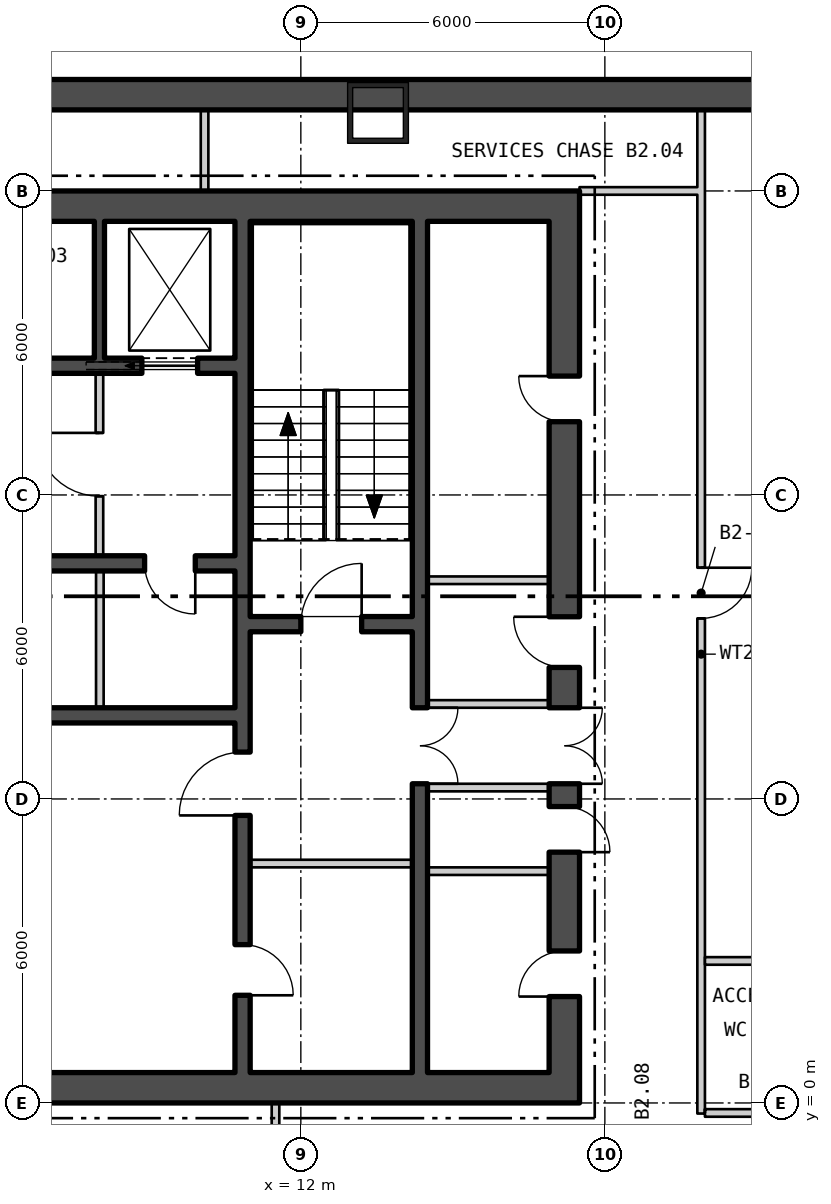
"""IFC4 building model, lengths in metres.
Left out: names, types, materials, properties, quantities, classifications, styles, units other than length and angle.
Written with IfcOpenShell. Run it as: python <this file> out.ifc"""

import sys

from ifc_helpers import new_model, si_unit, direction, frame, frame_2d, origin, origin_2d, place, context, subcontext, project, spatial, rectangle, hollow_rectangle, extrude, element, fill, save


model = new_model("IFC4")
c1 = context("Model", 3, precision=1e-05, world=origin(), true_north=direction((0.0, 1.0)))
c2 = subcontext(c1, "Body", "Model", "MODEL_VIEW")
j1 = project(units=[si_unit("LENGTHUNIT", "METRE"), si_unit("PLANEANGLEUNIT", "RADIAN")], contexts=[c1])
p1 = place(None, origin())
s1 = spatial("IfcSite", under=j1, at=p1, CompositionType="ELEMENT")
p2 = place(p1, origin())
s2 = spatial("IfcBuilding", under=s1, at=p2, CompositionType="ELEMENT")
p3 = place(p2, frame((0.0, 0.0, -11.4)))
s3 = spatial("IfcBuildingStorey", under=s2, at=p3, CompositionType="ELEMENT", Elevation=-11.4)
p4 = place(p3, frame((13.523, 19.54, 0.0), z_axis=(0.0, 0.0, 1.0), x_axis=(-1.0, 0.0, 0.0)))
e1 = element("IfcColumn", 1, at=p4, inside=s3, PredefinedType="COLUMN", context=c2, shape_type="SweptSolid", body=[
    extrude(hollow_rectangle(XDim=1.2, YDim=1.2, WallThickness=0.1, at=origin_2d()), origin(), (0.0, 0.0, 1.0), 5.7),
])
p5 = place(p3, frame((-39.0, 19.9, -0.4), z_axis=(0.0, 0.0, 1.0), x_axis=(1.0, 0.0, 0.0)))
e2 = element("IfcWall", 2, at=p5, inside=s3, PredefinedType="STANDARD", context=c2, shape_type="SweptSolid", body=[
    extrude(rectangle(XDim=78.0, YDim=0.6, at=frame_2d((39.0, 0.0))), origin(), (0.0, 0.0, 1.0), 5.7),
])
p6 = place(p3, frame((-17.5, 0.3, 0.0), z_axis=(0.0, 0.0, 1.0), x_axis=(1.0, 0.0, 0.0)))
e3 = element("IfcWall", 3, at=p6, inside=s3, PredefinedType="SHEAR", context=c2, shape_type="SweptSolid", body=[
    extrude(rectangle(XDim=35.0, YDim=0.6, at=frame_2d((17.5, 0.0))), origin(), (0.0, 0.0, 1.0), 5.25),
])
p7 = place(p6, frame((12.0, 0.0, 0.0)))
e4 = element("IfcOpeningElement", 4, at=p7, cuts=e3, PredefinedType="OPENING", context=c2, shape_type="SweptSolid", body=[
    extrude(rectangle(XDim=1.8, YDim=2.4, at=frame_2d((0.9, 1.2))), frame((0.0, 0.31, 0.0), z_axis=(0.0, -1.0, 0.0), x_axis=(1.0, 0.0, 0.0)), (0.0, 0.0, 1.0), 0.62),
])
p8 = place(p6, frame((22.0, 0.0, 0.0)))
e5 = element("IfcOpeningElement", 5, at=p8, cuts=e3, PredefinedType="OPENING", context=c2, shape_type="SweptSolid", body=[
    extrude(rectangle(XDim=1.8, YDim=2.4, at=frame_2d((0.9, 1.2))), frame((0.0, 0.31, 0.0), z_axis=(0.0, -1.0, 0.0), x_axis=(1.0, 0.0, 0.0)), (0.0, 0.0, 1.0), 0.62),
])
p9 = place(p3, frame((-17.5, 17.7, 0.0), z_axis=(0.0, 0.0, 1.0), x_axis=(1.0, 0.0, 0.0)))
e6 = element("IfcWall", 6, at=p9, inside=s3, PredefinedType="SHEAR", context=c2, shape_type="SweptSolid", body=[
    extrude(rectangle(XDim=35.0, YDim=0.6, at=frame_2d((17.5, 0.0))), origin(), (0.0, 0.0, 1.0), 5.25),
])
p10 = place(p3, frame((17.2, 0.6, 0.0), z_axis=(0.0, 0.0, 1.0), x_axis=(0.0, 1.0, 0.0)))
e7 = element("IfcWall", 7, at=p10, inside=s3, PredefinedType="SHEAR", context=c2, shape_type="SweptSolid", body=[
    extrude(rectangle(XDim=16.8, YDim=0.6, at=frame_2d((8.4, 0.0))), origin(), (0.0, 0.0, 1.0), 5.25),
])
p11 = place(p10, frame((5.7, 0.0, 0.0)))
e8 = element("IfcOpeningElement", 8, at=p11, cuts=e7, PredefinedType="OPENING", context=c2, shape_type="SweptSolid", body=[
    extrude(rectangle(XDim=1.5, YDim=2.1, at=frame_2d((0.75, 1.05))), frame((0.0, 0.31, 0.0), z_axis=(0.0, -1.0, 0.0), x_axis=(1.0, 0.0, 0.0)), (0.0, 0.0, 1.0), 0.62),
])
p12 = place(p10, frame((1.5, 0.0, 0.0)))
e9 = element("IfcOpeningElement", 9, at=p12, cuts=e7, PredefinedType="OPENING", context=c2, shape_type="SweptSolid", body=[
    extrude(rectangle(XDim=0.9, YDim=2.1, at=frame_2d((0.45, 1.05))), frame((0.0, 0.31, 0.0), z_axis=(0.0, -1.0, 0.0), x_axis=(1.0, 0.0, 0.0)), (0.0, 0.0, 1.0), 0.62),
])
p13 = place(p10, frame((4.35, 0.0, 0.0)))
e10 = element("IfcOpeningElement", 10, at=p13, cuts=e7, PredefinedType="OPENING", context=c2, shape_type="SweptSolid", body=[
    extrude(rectangle(XDim=0.9, YDim=2.1, at=frame_2d((0.45, 1.05))), frame((0.0, 0.31, 0.0), z_axis=(0.0, -1.0, 0.0), x_axis=(1.0, 0.0, 0.0)), (0.0, 0.0, 1.0), 0.62),
])
p14 = place(p10, frame((7.996, 0.0, 0.0)))
e11 = element("IfcOpeningElement", 11, at=p14, cuts=e7, PredefinedType="OPENING", context=c2, shape_type="SweptSolid", body=[
    extrude(rectangle(XDim=1.0, YDim=2.1, at=frame_2d((0.5, 1.05))), frame((0.0, 0.31, 0.0), z_axis=(0.0, -1.0, 0.0), x_axis=(1.0, 0.0, 0.0)), (0.0, 0.0, 1.0), 0.62),
])
p15 = place(p10, frame((12.846, 0.0, 0.0)))
e12 = element("IfcOpeningElement", 12, at=p15, cuts=e7, PredefinedType="OPENING", context=c2, shape_type="SweptSolid", body=[
    extrude(rectangle(XDim=0.9, YDim=2.1, at=frame_2d((0.45, 1.05))), frame((0.0, 0.31, 0.0), z_axis=(0.0, -1.0, 0.0), x_axis=(1.0, 0.0, 0.0)), (0.0, 0.0, 1.0), 0.62),
])
p16 = place(p3, frame((10.85, 0.6, 0.0), z_axis=(0.0, 0.0, 1.0), x_axis=(0.0, 1.0, 0.0)))
e13 = element("IfcWall", 13, at=p16, inside=s3, PredefinedType="SHEAR", context=c2, shape_type="SweptSolid", body=[
    extrude(rectangle(XDim=16.8, YDim=0.3, at=frame_2d((8.4, 0.0))), origin(), (0.0, 0.0, 1.0), 5.25),
])
p17 = place(p16, frame((5.075, 0.0, 0.0)))
e14 = element("IfcOpeningElement", 14, at=p17, cuts=e13, PredefinedType="OPENING", context=c2, shape_type="SweptSolid", body=[
    extrude(rectangle(XDim=1.25, YDim=2.1, at=frame_2d((0.625, 1.05))), frame((0.0, 0.16, 0.0), z_axis=(0.0, -1.0, 0.0), x_axis=(1.0, 0.0, 0.0)), (0.0, 0.0, 1.0), 0.32),
])
p18 = place(p16, frame((1.525, 0.0, 0.0)))
e15 = element("IfcOpeningElement", 15, at=p18, cuts=e13, PredefinedType="OPENING", context=c2, shape_type="SweptSolid", body=[
    extrude(rectangle(XDim=1.0, YDim=2.1, at=frame_2d((0.5, 1.05))), frame((0.0, 0.16, 0.0), z_axis=(0.0, -1.0, 0.0), x_axis=(1.0, 0.0, 0.0)), (0.0, 0.0, 1.0), 0.32),
])
p19 = place(p3, frame((14.35, 0.6, 0.0), z_axis=(0.0, 0.0, 1.0), x_axis=(0.0, 1.0, 0.0)))
e16 = element("IfcWall", 16, at=p19, inside=s3, PredefinedType="SHEAR", context=c2, shape_type="SweptSolid", body=[
    extrude(rectangle(XDim=16.8, YDim=0.3, at=frame_2d((8.4, 0.0))), origin(), (0.0, 0.0, 1.0), 5.25),
])
p20 = place(p19, frame((5.7, 0.0, 0.0)))
e17 = element("IfcOpeningElement", 17, at=p20, cuts=e16, PredefinedType="OPENING", context=c2, shape_type="SweptSolid", body=[
    extrude(rectangle(XDim=1.5, YDim=2.1, at=frame_2d((0.75, 1.05))), frame((0.0, 0.16, 0.0), z_axis=(0.0, -1.0, 0.0), x_axis=(1.0, 0.0, 0.0)), (0.0, 0.0, 1.0), 0.32),
])
p21 = place(p3, frame((11.0, 9.45, 0.0), z_axis=(0.0, 0.0, 1.0), x_axis=(1.0, 0.0, 0.0)))
e18 = element("IfcWall", 18, at=p21, inside=s3, PredefinedType="SHEAR", context=c2, shape_type="SweptSolid", body=[
    extrude(rectangle(XDim=3.2, YDim=0.3, at=frame_2d((1.6, 0.0))), origin(), (0.0, 0.0, 1.0), 5.25),
])
p22 = place(p21, frame((1.0, 0.0, 0.0)))
e19 = element("IfcOpeningElement", 19, at=p22, cuts=e18, PredefinedType="OPENING", context=c2, shape_type="SweptSolid", body=[
    extrude(rectangle(XDim=1.2, YDim=2.1, at=frame_2d((0.6, 1.05))), frame((0.0, 0.16, 0.0), z_axis=(0.0, -1.0, 0.0), x_axis=(1.0, 0.0, 0.0)), (0.0, 0.0, 1.0), 0.32),
])
p23 = place(p3, frame((-10.7, 14.55, 0.0), z_axis=(0.0, 0.0, 1.0), x_axis=(1.0, 0.0, 0.0)))
e20 = element("IfcWall", 20, at=p23, inside=s3, PredefinedType="SHEAR", context=c2, shape_type="SweptSolid", body=[
    extrude(rectangle(XDim=21.4, YDim=0.3, at=frame_2d((10.7, 0.0))), origin(), (0.0, 0.0, 1.0), 5.25),
])
p24 = place(p23, frame((0.738, 0.0, 0.0)))
e21 = element("IfcOpeningElement", 21, at=p24, cuts=e20, PredefinedType="OPENING", context=c2, shape_type="SweptSolid", body=[
    extrude(rectangle(XDim=1.1, YDim=2.1, at=frame_2d((0.55, 1.05))), frame((0.0, 0.16, 0.0), z_axis=(0.0, -1.0, 0.0), x_axis=(1.0, 0.0, 0.0)), (0.0, 0.0, 1.0), 0.32),
])
p25 = place(p23, frame((19.562, 0.0, 0.0)))
e22 = element("IfcOpeningElement", 22, at=p25, cuts=e20, PredefinedType="OPENING", context=c2, shape_type="SweptSolid", body=[
    extrude(rectangle(XDim=1.1, YDim=2.1, at=frame_2d((0.55, 1.05))), frame((0.0, 0.16, 0.0), z_axis=(0.0, -1.0, 0.0), x_axis=(1.0, 0.0, 0.0)), (0.0, 0.0, 1.0), 0.32),
])
p26 = place(p23, frame((3.513, 0.0, 0.0)))
e23 = element("IfcOpeningElement", 23, at=p26, cuts=e20, PredefinedType="OPENING", context=c2, shape_type="SweptSolid", body=[
    extrude(rectangle(XDim=1.0, YDim=2.1, at=frame_2d((0.5, 1.05))), frame((0.0, 0.16, 0.0), z_axis=(0.0, -1.0, 0.0), x_axis=(1.0, 0.0, 0.0)), (0.0, 0.0, 1.0), 0.32),
])
p27 = place(p23, frame((6.188, 0.0, 0.0)))
e24 = element("IfcOpeningElement", 24, at=p27, cuts=e20, PredefinedType="OPENING", context=c2, shape_type="SweptSolid", body=[
    extrude(rectangle(XDim=1.0, YDim=2.1, at=frame_2d((0.5, 1.05))), frame((0.0, 0.16, 0.0), z_axis=(0.0, -1.0, 0.0), x_axis=(1.0, 0.0, 0.0)), (0.0, 0.0, 1.0), 0.32),
])
p28 = place(p23, frame((8.863, 0.0, 0.0)))
e25 = element("IfcOpeningElement", 25, at=p28, cuts=e20, PredefinedType="OPENING", context=c2, shape_type="SweptSolid", body=[
    extrude(rectangle(XDim=1.0, YDim=2.1, at=frame_2d((0.5, 1.05))), frame((0.0, 0.16, 0.0), z_axis=(0.0, -1.0, 0.0), x_axis=(1.0, 0.0, 0.0)), (0.0, 0.0, 1.0), 0.32),
])
p29 = place(p23, frame((14.213, 0.0, 0.0)))
e26 = element("IfcOpeningElement", 26, at=p29, cuts=e20, PredefinedType="OPENING", context=c2, shape_type="SweptSolid", body=[
    extrude(rectangle(XDim=1.0, YDim=2.1, at=frame_2d((0.5, 1.05))), frame((0.0, 0.16, 0.0), z_axis=(0.0, -1.0, 0.0), x_axis=(1.0, 0.0, 0.0)), (0.0, 0.0, 1.0), 0.32),
])
p30 = place(p3, frame((2.6, 10.65, 0.0), z_axis=(0.0, 0.0, 1.0), x_axis=(1.0, 0.0, 0.0)))
e27 = element("IfcWall", 27, at=p30, inside=s3, PredefinedType="SHEAR", context=c2, shape_type="SweptSolid", body=[
    extrude(rectangle(XDim=8.1, YDim=0.3, at=frame_2d((4.05, 0.0))), origin(), (0.0, 0.0, 1.0), 5.25),
])
p31 = place(p30, frame((2.267, 0.0, 0.0)))
e28 = element("IfcOpeningElement", 28, at=p31, cuts=e27, PredefinedType="OPENING", context=c2, shape_type="SweptSolid", body=[
    extrude(rectangle(XDim=1.0, YDim=2.1, at=frame_2d((0.5, 1.05))), frame((0.0, 0.16, 0.0), z_axis=(0.0, -1.0, 0.0), x_axis=(1.0, 0.0, 0.0)), (0.0, 0.0, 1.0), 0.32),
])
p32 = place(p30, frame((6.317, 0.0, 0.0)))
e29 = element("IfcOpeningElement", 29, at=p32, cuts=e27, PredefinedType="OPENING", context=c2, shape_type="SweptSolid", body=[
    extrude(rectangle(XDim=1.0, YDim=2.1, at=frame_2d((0.5, 1.05))), frame((0.0, 0.16, 0.0), z_axis=(0.0, -1.0, 0.0), x_axis=(1.0, 0.0, 0.0)), (0.0, 0.0, 1.0), 0.32),
])
p33 = place(p3, frame((2.6, 7.65, 0.0), z_axis=(0.0, 0.0, 1.0), x_axis=(1.0, 0.0, 0.0)))
e30 = element("IfcWall", 30, at=p33, inside=s3, PredefinedType="SHEAR", context=c2, shape_type="SweptSolid", body=[
    extrude(rectangle(XDim=8.1, YDim=0.3, at=frame_2d((4.05, 0.0))), origin(), (0.0, 0.0, 1.0), 5.25),
])
p34 = place(p3, frame((8.025, 14.7, 0.0), z_axis=(0.0, 0.0, 1.0), x_axis=(0.0, 1.0, 0.0)))
e31 = element("IfcWall", 31, at=p34, inside=s3, PredefinedType="SHEAR", context=c2, shape_type="SweptSolid", body=[
    extrude(rectangle(XDim=2.7, YDim=0.2, at=frame_2d((1.35, 0.0))), origin(), (0.0, 0.0, 1.0), 5.25),
])
p35 = place(p3, frame((8.033, 7.8, 0.0), z_axis=(0.0, 0.0, 1.0), x_axis=(0.0, 1.0, 0.0)))
e32 = element("IfcWall", 32, at=p35, inside=s3, PredefinedType="PARTITIONING", context=c2, shape_type="SweptSolid", body=[
    extrude(rectangle(XDim=2.7, YDim=0.15, at=frame_2d((1.35, 0.0))), origin(), (0.0, 0.0, 1.0), 5.25),
])
p36 = place(p3, frame((8.025, 10.8, 0.0), z_axis=(0.0, 0.0, 1.0), x_axis=(0.0, 1.0, 0.0)))
e33 = element("IfcWall", 33, at=p36, inside=s3, PredefinedType="PARTITIONING", context=c2, shape_type="SweptSolid", body=[
    extrude(rectangle(XDim=3.6, YDim=0.15, at=frame_2d((1.8, 0.0))), origin(), (0.0, 0.0, 1.0), 5.25),
])
p37 = place(p36, frame((1.175, 0.0, 0.0)))
e34 = element("IfcOpeningElement", 34, at=p37, cuts=e33, PredefinedType="OPENING", context=c2, shape_type="SweptSolid", body=[
    extrude(rectangle(XDim=1.25, YDim=2.1, at=frame_2d((0.625, 1.05))), frame((0.0, 0.085, 0.0), z_axis=(0.0, -1.0, 0.0), x_axis=(1.0, 0.0, 0.0)), (0.0, 0.0, 1.0), 0.17),
])
p38 = place(p3, frame((11.0, 4.725, 0.0), z_axis=(0.0, 0.0, 1.0), x_axis=(1.0, 0.0, 0.0)))
e35 = element("IfcWall", 35, at=p38, inside=s3, PredefinedType="PARTITIONING", context=c2, shape_type="SweptSolid", body=[
    extrude(rectangle(XDim=3.2, YDim=0.15, at=frame_2d((1.6, 0.0))), origin(), (0.0, 0.0, 1.0), 5.25),
])
for number, where, z_axis, x_axis in (
    (36, (14.5, 6.225, 0.0), (0.0, 0.0, 1.0), (1.0, 0.0, 0.0)),
    (37, (14.5, 7.875, 0.0), (0.0, 0.0, 1.0), (1.0, 0.0, 0.0)),
    (38, (14.5, 4.575, 0.0), (0.0, 0.0, 1.0), (1.0, 0.0, 0.0)),
    (39, (14.5, 10.317, 0.0), (0.0, 0.0, 1.0), (1.0, 0.0, 0.0)),
):
    element("IfcWall", number, at=place(p3, frame(where, z_axis=z_axis, x_axis=x_axis)), inside=s3, PredefinedType="PARTITIONING", context=c2, shape_type="SweptSolid", body=[
        extrude(rectangle(XDim=2.4, YDim=0.15, at=frame_2d((1.2, 0.0))), origin(), (0.0, 0.0, 1.0), 5.25),
    ])
p39 = place(p3, frame((10.1, 18.0, 0.0), z_axis=(0.0, 0.0, 1.0), x_axis=(0.0, 1.0, 0.0)))
e40 = element("IfcWall", 40, at=p39, inside=s3, PredefinedType="PARTITIONING", context=c2, shape_type="SweptSolid", body=[
    extrude(rectangle(XDim=1.75, YDim=0.15, at=frame_2d((0.875, 0.0))), origin(), (0.0, 0.0, 1.0), 5.25),
])
p40 = place(p3, frame((11.5, -6.075, 0.0), z_axis=(0.0, 0.0, 1.0), x_axis=(0.0, 1.0, 0.0)))
e41 = element("IfcWall", 41, at=p40, inside=s3, PredefinedType="PARTITIONING", context=c2, shape_type="SweptSolid", body=[
    extrude(rectangle(XDim=6.075, YDim=0.15, at=frame_2d((3.038, 0.0))), origin(), (0.0, 0.0, 1.0), 5.25),
])
p41 = place(p40, frame((4.375, 0.0, 0.0)))
e42 = element("IfcOpeningElement", 42, at=p41, cuts=e41, PredefinedType="OPENING", context=c2, shape_type="SweptSolid", body=[
    extrude(rectangle(XDim=1.0, YDim=2.1, at=frame_2d((0.5, 1.05))), frame((0.0, 0.085, 0.0), z_axis=(0.0, -1.0, 0.0), x_axis=(1.0, 0.0, 0.0)), (0.0, 0.0, 1.0), 0.17),
])
p42 = place(p3, frame((17.5, 18.0, 0.0), z_axis=(0.0, 0.0, 1.0), x_axis=(1.0, 0.0, 0.0)))
e43 = element("IfcWall", 43, at=p42, inside=s3, PredefinedType="PARTITIONING", context=c2, shape_type="SweptSolid", body=[
    extrude(rectangle(XDim=2.475, YDim=0.15, at=frame_2d((1.238, 0.0))), origin(), (0.0, 0.0, 1.0), 5.25),
])
p43 = place(p3, frame((19.9, -0.209, 0.0), z_axis=(0.0, 0.0, 1.0), x_axis=(0.0, 1.0, 0.0)))
e44 = element("IfcWall", 44, at=p43, inside=s3, PredefinedType="PARTITIONING", context=c2, shape_type="SweptSolid", body=[
    extrude(rectangle(XDim=18.134, YDim=0.15, at=frame_2d((9.067, 0.0))), origin(), (0.0, 0.0, 1.0), 5.25),
])
p44 = place(p43, frame((9.773, 0.0, 0.0)))
e45 = element("IfcOpeningElement", 45, at=p44, cuts=e44, PredefinedType="OPENING", context=c2, shape_type="SweptSolid", body=[
    extrude(rectangle(XDim=1.0, YDim=2.1, at=frame_2d((0.5, 1.05))), frame((0.0, 0.085, 0.0), z_axis=(0.0, -1.0, 0.0), x_axis=(1.0, 0.0, 0.0)), (0.0, 0.0, 1.0), 0.17),
])
p45 = place(p3, frame((19.9, 18.075, 0.0), z_axis=(0.0, 0.0, 1.0), x_axis=(0.0, 1.0, 0.0)))
e46 = element("IfcWall", 46, at=p45, inside=s3, PredefinedType="PARTITIONING", context=c2, shape_type="SweptSolid", body=[
    extrude(rectangle(XDim=1.675, YDim=0.15, at=frame_2d((0.838, 0.0))), origin(), (0.0, 0.0, 1.0), 5.25),
])
p46 = place(p3, frame((19.975, 2.803, 0.0), z_axis=(0.0, 0.0, 1.0), x_axis=(1.0, 0.0, 0.0)))
e47 = element("IfcWall", 47, at=p46, inside=s3, PredefinedType="PARTITIONING", context=c2, shape_type="SweptSolid", body=[
    extrude(rectangle(XDim=2.925, YDim=0.15, at=frame_2d((1.462, 0.0))), origin(), (0.0, 0.0, 1.0), 5.25),
])
p47 = place(p3, frame((19.975, -0.197, 0.0), z_axis=(0.0, 0.0, 1.0), x_axis=(0.999999901962, -0.000442804385, 0.0)))
e48 = element("IfcWall", 48, at=p47, inside=s3, PredefinedType="PARTITIONING", context=c2, shape_type="SweptSolid", body=[
    extrude(rectangle(XDim=6.775, YDim=0.15, at=frame_2d((3.388, 0.0))), origin(), (0.0, 0.0, 1.0), 5.25),
])
p48 = place(p47, frame((0.962, 0.0, 0.0)))
e49 = element("IfcOpeningElement", 49, at=p48, cuts=e48, PredefinedType="OPENING", context=c2, shape_type="SweptSolid", body=[
    extrude(rectangle(XDim=1.0, YDim=2.1, at=frame_2d((0.5, 1.05))), frame((0.0, 0.085, 0.0), z_axis=(0.0, -1.0, 0.0), x_axis=(1.0, 0.0, 0.0)), (0.0, 0.0, 1.0), 0.17),
])
p49 = place(p25, origin())
e50 = element("IfcDoor", 50, at=p49, inside=s3, OperationType="SLIDING_TO_LEFT", PredefinedType="DOOR", context=c2, shape_type="SweptSolid", body=[
    extrude(rectangle(XDim=1.1, YDim=2.1, at=frame_2d((0.55, 1.05))), frame((0.0, 0.025, 0.0), z_axis=(0.0, -1.0, 0.0), x_axis=(1.0, 0.0, 0.0)), (0.0, 0.0, 1.0), 0.05),
])
fill(e22, e50)
p50 = place(p32, origin())
e51 = element("IfcDoor", 51, at=p50, inside=s3, OperationType="SINGLE_SWING_RIGHT", PredefinedType="DOOR", context=c2, shape_type="SweptSolid", body=[
    extrude(rectangle(XDim=1.0, YDim=2.1, at=frame_2d((0.5, 1.05))), frame((0.0, 0.025, 0.0), z_axis=(0.0, -1.0, 0.0), x_axis=(1.0, 0.0, 0.0)), (0.0, 0.0, 1.0), 0.05),
])
fill(e29, e51)
p51 = place(p37, origin())
e52 = element("IfcDoor", 52, at=p51, inside=s3, OperationType="SINGLE_SWING_LEFT", PredefinedType="DOOR", context=c2, shape_type="SweptSolid", body=[
    extrude(rectangle(XDim=1.25, YDim=2.1, at=frame_2d((0.625, 1.05))), frame((0.0, 0.025, 0.0), z_axis=(0.0, -1.0, 0.0), x_axis=(1.0, 0.0, 0.0)), (0.0, 0.0, 1.0), 0.05),
])
fill(e34, e52)
p52 = place(p22, origin())
e53 = element("IfcDoor", 53, at=p52, inside=s3, OperationType="SINGLE_SWING_LEFT", PredefinedType="DOOR", context=c2, shape_type="SweptSolid", body=[
    extrude(rectangle(XDim=1.2, YDim=2.1, at=frame_2d((0.6, 1.05))), frame((0.0, 0.025, 0.0), z_axis=(0.0, -1.0, 0.0), x_axis=(1.0, 0.0, 0.0)), (0.0, 0.0, 1.0), 0.05),
])
fill(e19, e53)
p53 = place(p17, origin())
e54 = element("IfcDoor", 54, at=p53, inside=s3, OperationType="SINGLE_SWING_RIGHT", PredefinedType="DOOR", context=c2, shape_type="SweptSolid", body=[
    extrude(rectangle(XDim=1.25, YDim=2.1, at=frame_2d((0.625, 1.05))), frame((0.0, 0.025, 0.0), z_axis=(0.0, -1.0, 0.0), x_axis=(1.0, 0.0, 0.0)), (0.0, 0.0, 1.0), 0.05),
])
fill(e14, e54)
p54 = place(p18, origin())
e55 = element("IfcDoor", 55, at=p54, inside=s3, OperationType="SINGLE_SWING_LEFT", PredefinedType="DOOR", context=c2, shape_type="SweptSolid", body=[
    extrude(rectangle(XDim=1.0, YDim=2.1, at=frame_2d((0.5, 1.05))), frame((0.0, 0.025, 0.0), z_axis=(0.0, -1.0, 0.0), x_axis=(1.0, 0.0, 0.0)), (0.0, 0.0, 1.0), 0.05),
])
fill(e15, e55)
p55 = place(p20, origin())
e56 = element("IfcDoor", 56, at=p55, inside=s3, OperationType="DOUBLE_DOOR_SINGLE_SWING", PredefinedType="DOOR", context=c2, shape_type="SweptSolid", body=[
    extrude(rectangle(XDim=1.5, YDim=2.1, at=frame_2d((0.75, 1.05))), frame((0.0, 0.025, 0.0), z_axis=(0.0, -1.0, 0.0), x_axis=(1.0, 0.0, 0.0)), (0.0, 0.0, 1.0), 0.05),
])
fill(e17, e56)
p56 = place(p11, origin())
e57 = element("IfcDoor", 57, at=p56, inside=s3, OperationType="DOUBLE_DOOR_SINGLE_SWING", PredefinedType="DOOR", context=c2, shape_type="SweptSolid", body=[
    extrude(rectangle(XDim=1.5, YDim=2.1, at=frame_2d((0.75, 1.05))), frame((0.0, 0.025, 0.0), z_axis=(0.0, -1.0, 0.0), x_axis=(1.0, 0.0, 0.0)), (0.0, 0.0, 1.0), 0.05),
])
fill(e8, e57)
p57 = place(p12, origin())
e58 = element("IfcDoor", 58, at=p57, inside=s3, OperationType="SINGLE_SWING_RIGHT", PredefinedType="DOOR", context=c2, shape_type="SweptSolid", body=[
    extrude(rectangle(XDim=0.9, YDim=2.1, at=frame_2d((0.45, 1.05))), frame((0.0, 0.025, 0.0), z_axis=(0.0, -1.0, 0.0), x_axis=(1.0, 0.0, 0.0)), (0.0, 0.0, 1.0), 0.05),
])
fill(e9, e58)
p58 = place(p13, origin())
e59 = element("IfcDoor", 59, at=p58, inside=s3, OperationType="SINGLE_SWING_LEFT", PredefinedType="DOOR", context=c2, shape_type="SweptSolid", body=[
    extrude(rectangle(XDim=0.9, YDim=2.1, at=frame_2d((0.45, 1.05))), frame((0.0, 0.025, 0.0), z_axis=(0.0, -1.0, 0.0), x_axis=(1.0, 0.0, 0.0)), (0.0, 0.0, 1.0), 0.05),
])
fill(e10, e59)
p59 = place(p14, origin())
e60 = element("IfcDoor", 60, at=p59, inside=s3, OperationType="SINGLE_SWING_LEFT", PredefinedType="DOOR", context=c2, shape_type="SweptSolid", body=[
    extrude(rectangle(XDim=1.0, YDim=2.1, at=frame_2d((0.5, 1.05))), frame((0.0, 0.025, 0.0), z_axis=(0.0, -1.0, 0.0), x_axis=(1.0, 0.0, 0.0)), (0.0, 0.0, 1.0), 0.05),
])
fill(e11, e60)
p60 = place(p15, origin())
e61 = element("IfcDoor", 61, at=p60, inside=s3, OperationType="SINGLE_SWING_LEFT", PredefinedType="DOOR", context=c2, shape_type="SweptSolid", body=[
    extrude(rectangle(XDim=0.9, YDim=2.1, at=frame_2d((0.45, 1.05))), frame((0.0, 0.025, 0.0), z_axis=(0.0, -1.0, 0.0), x_axis=(1.0, 0.0, 0.0)), (0.0, 0.0, 1.0), 0.05),
])
fill(e12, e61)
p61 = place(p44, origin())
e62 = element("IfcDoor", 62, at=p61, inside=s3, OperationType="SINGLE_SWING_RIGHT", PredefinedType="DOOR", context=c2, shape_type="SweptSolid", body=[
    extrude(rectangle(XDim=1.0, YDim=2.1, at=frame_2d((0.5, 1.05))), frame((0.0, 0.025, 0.0), z_axis=(0.0, -1.0, 0.0), x_axis=(1.0, 0.0, 0.0)), (0.0, 0.0, 1.0), 0.05),
])
fill(e45, e62)
save(model, sys.argv[1])
